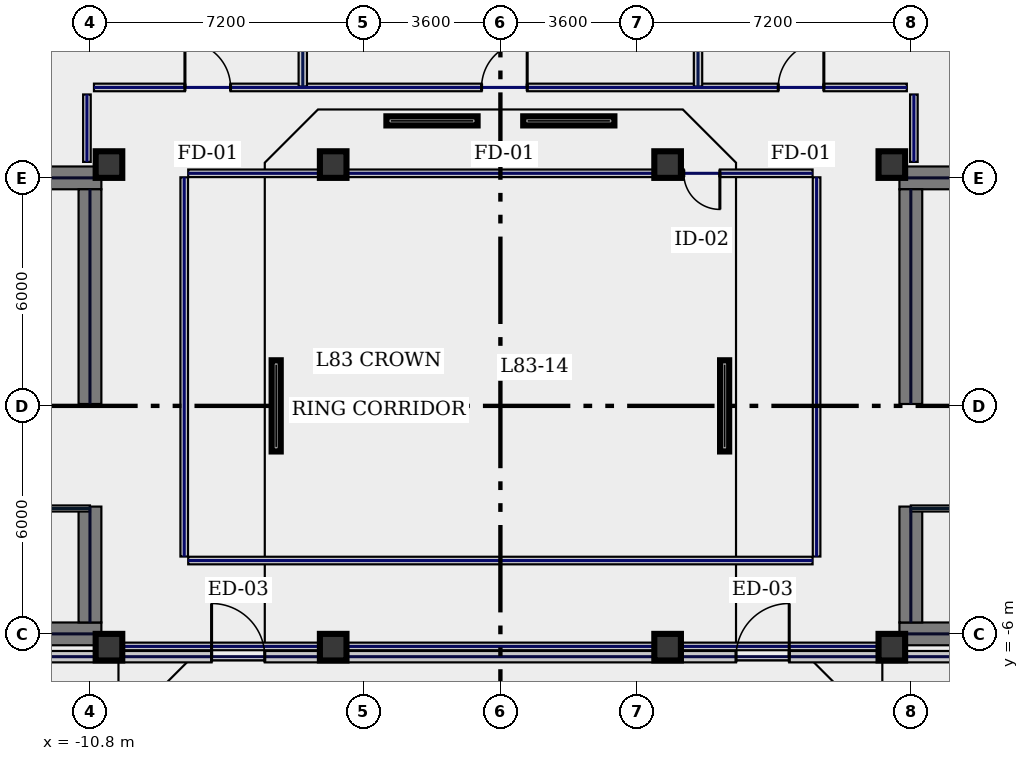
"""IFC4 building model, lengths in metres.
Left out: names, types, materials, properties, quantities, classifications, styles, units other than length and angle.
Written with IfcOpenShell. Run it as: python <this file> out.ifc"""

import sys

from ifc_helpers import new_model, si_unit, direction, frame, frame_2d, origin, origin_2d, place, context, subcontext, project, spatial, rectangle, hollow_rectangle, extrude, element, fill, save


model = new_model("IFC4")
c1 = context("Model", 3, precision=1e-05, world=origin(), true_north=direction((0.0, 1.0)))
c2 = subcontext(c1, "Body", "Model", "MODEL_VIEW")
j1 = project(units=[si_unit("LENGTHUNIT", "METRE"), si_unit("PLANEANGLEUNIT", "RADIAN")], contexts=[c1])
p1 = place(None, origin())
s1 = spatial("IfcSite", under=j1, at=p1, CompositionType="ELEMENT")
p2 = place(p1, origin())
s2 = spatial("IfcBuilding", under=s1, at=p2, CompositionType="ELEMENT")
p3 = place(p2, frame((0.0, 0.0, 357.0)))
s3 = spatial("IfcBuildingStorey", under=s2, at=p3, CompositionType="ELEMENT", Elevation=357.0)
for number, where, z_axis, x_axis in (
    (1, (-22.0, 6.0, 0.0), (0.0, 0.0, 1.0), (1.0, 0.0, 0.0)),
    (2, (-22.0, -6.0, 0.0), (0.0, 0.0, 1.0), (1.0, 0.0, 0.0)),
):
    element("IfcWall", number, at=place(p3, frame(where, z_axis=z_axis, x_axis=x_axis)), inside=s3, PredefinedType="SHEAR", context=c2, shape_type="SweptSolid", body=[
        extrude(rectangle(XDim=11.5, YDim=0.6, at=frame_2d((5.75, 0.0))), origin(), (0.0, 0.0, 1.0), 3.7),
    ])
p4 = place(p3, frame((-10.8, -5.7, 0.0), z_axis=(0.0, 0.0, 1.0), x_axis=(0.0, 1.0, 0.0)))
e3 = element("IfcWall", 3, at=p4, inside=s3, PredefinedType="SHEAR", context=c2, shape_type="SweptSolid", body=[
    extrude(rectangle(XDim=3.05, YDim=0.6, at=frame_2d((1.525, 0.0))), origin(), (0.0, 0.0, 1.0), 3.7),
])
p5 = place(p3, frame((-10.8, 0.05, 0.0), z_axis=(0.0, 0.0, 1.0), x_axis=(0.0, 1.0, 0.0)))
e4 = element("IfcWall", 4, at=p5, inside=s3, PredefinedType="SHEAR", context=c2, shape_type="SweptSolid", body=[
    extrude(rectangle(XDim=5.65, YDim=0.6, at=frame_2d((2.825, 0.0))), origin(), (0.0, 0.0, 1.0), 3.7),
])
for number, where, z_axis, x_axis in (
    (5, (10.5, 6.0, 0.0), (0.0, 0.0, 1.0), (1.0, 0.0, 0.0)),
    (6, (10.5, -6.0, 0.0), (0.0, 0.0, 1.0), (1.0, 0.0, 0.0)),
):
    element("IfcWall", number, at=place(p3, frame(where, z_axis=z_axis, x_axis=x_axis)), inside=s3, PredefinedType="SHEAR", context=c2, shape_type="SweptSolid", body=[
        extrude(rectangle(XDim=11.5, YDim=0.6, at=frame_2d((5.75, 0.0))), origin(), (0.0, 0.0, 1.0), 3.7),
    ])
p6 = place(p3, frame((10.8, -5.7, 0.0), z_axis=(0.0, 0.0, 1.0), x_axis=(0.0, 1.0, 0.0)))
e7 = element("IfcWall", 7, at=p6, inside=s3, PredefinedType="SHEAR", context=c2, shape_type="SweptSolid", body=[
    extrude(rectangle(XDim=3.05, YDim=0.6, at=frame_2d((1.525, 0.0))), origin(), (0.0, 0.0, 1.0), 3.7),
])
p7 = place(p3, frame((10.8, 0.05, 0.0), z_axis=(0.0, 0.0, 1.0), x_axis=(0.0, 1.0, 0.0)))
e8 = element("IfcWall", 8, at=p7, inside=s3, PredefinedType="SHEAR", context=c2, shape_type="SweptSolid", body=[
    extrude(rectangle(XDim=5.65, YDim=0.6, at=frame_2d((2.825, 0.0))), origin(), (0.0, 0.0, 1.0), 3.7),
])
for number, where, z_axis, x_axis in (
    (9, (-10.3, -6.35, 0.0), (0.0, 0.0, 1.0), (1.0, 0.0, 0.0)),
    (10, (-10.3, 6.35, 0.0), (0.0, 0.0, 1.0), (1.0, 0.0, 0.0)),
    (11, (10.3, -6.35, 0.0), (0.0, 0.0, 1.0), (1.0, 0.0, 0.0)),
    (12, (10.3, 6.35, 0.0), (0.0, 0.0, 1.0), (1.0, 0.0, 0.0)),
    (13, (-4.4, -6.35, 0.0), (0.0, 0.0, 1.0), (1.0, 0.0, 0.0)),
    (14, (4.4, -6.35, 0.0), (0.0, 0.0, 1.0), (1.0, 0.0, 0.0)),
    (15, (-4.4, 6.35, 0.0), (0.0, 0.0, 1.0), (1.0, 0.0, 0.0)),
    (16, (4.4, 6.35, 0.0), (0.0, 0.0, 1.0), (1.0, 0.0, 0.0)),
):
    element("IfcColumn", number, at=place(p3, frame(where, z_axis=z_axis, x_axis=x_axis)), inside=s3, PredefinedType="COLUMN", context=c2, shape_type="SweptSolid", body=[
        extrude(hollow_rectangle(XDim=0.7, YDim=0.7, WallThickness=0.032, at=origin_2d()), origin(), (0.0, 0.0, 1.0), 3.7),
    ])
p8 = place(p3, frame((-23.25, -6.6, 0.0), z_axis=(0.0, 0.0, 1.0), x_axis=(1.0, 0.0, 0.0)))
e17 = element("IfcWall", 17, at=p8, inside=s3, PredefinedType="STANDARD", context=c2, shape_type="SweptSolid", body=[
    extrude(rectangle(XDim=46.5, YDim=0.3, at=frame_2d((23.25, 0.0))), origin(), (0.0, 0.0, 1.0), 2.695),
])
p9 = place(p8, frame((15.65, 0.0, 0.32)))
e18 = element("IfcOpeningElement", 18, at=p9, cuts=e17, PredefinedType="OPENING", context=c2, shape_type="SweptSolid", body=[
    extrude(rectangle(XDim=1.4, YDim=2.2, at=frame_2d((0.7, 1.1))), frame((0.0, 0.16, 0.0), z_axis=(0.0, -1.0, 0.0), x_axis=(1.0, 0.0, 0.0)), (0.0, 0.0, 1.0), 0.32),
])
p10 = place(p8, frame((29.45, 0.0, 0.32)))
e19 = element("IfcOpeningElement", 19, at=p10, cuts=e17, PredefinedType="OPENING", context=c2, shape_type="SweptSolid", body=[
    extrude(rectangle(XDim=1.4, YDim=2.2, at=frame_2d((0.7, 1.1))), frame((0.0, 0.16, 0.0), z_axis=(0.0, -1.0, 0.0), x_axis=(1.0, 0.0, 0.0)), (0.0, 0.0, 1.0), 0.32),
])
for number, where, z_axis, x_axis in (
    (20, (-14.535, -2.7, 0.0), (0.0, 0.0, 1.0), (1.0, 0.0, 0.0)),
    (21, (10.8, -2.7, 0.0), (0.0, 0.0, 1.0), (1.0, 0.0, 0.0)),
):
    element("IfcWall", number, at=place(p3, frame(where, z_axis=z_axis, x_axis=x_axis)), inside=s3, PredefinedType="PARTITIONING", context=c2, shape_type="SweptSolid", body=[
        extrude(rectangle(XDim=3.735, YDim=0.16, at=frame_2d((1.867, 0.0))), origin(), (0.0, 0.0, 1.0), 3.7),
    ])
p11 = place(p3, frame((-10.88, 6.42, 0.0), z_axis=(0.0, 0.0, 1.0), x_axis=(0.0, 1.0, 0.0)))
e22 = element("IfcWall", 22, at=p11, inside=s3, PredefinedType="SOLIDWALL", context=c2, shape_type="SweptSolid", body=[
    extrude(rectangle(XDim=1.775, YDim=0.2, at=frame_2d((0.888, 0.0))), origin(), (0.0, 0.0, 1.0), 3.7),
])
p12 = place(p3, frame((-10.695, 8.38, 0.0), z_axis=(0.0, 0.0, 1.0), x_axis=(1.0, 0.0, 0.0)))
e23 = element("IfcWall", 23, at=p12, inside=s3, PredefinedType="SOLIDWALL", context=c2, shape_type="SweptSolid", body=[
    extrude(rectangle(XDim=21.39, YDim=0.2, at=frame_2d((10.695, 0.0))), origin(), (0.0, 0.0, 1.0), 3.7),
])
p13 = place(p12, frame((10.2, 0.0, 0.0)))
e24 = element("IfcOpeningElement", 24, at=p13, cuts=e23, PredefinedType="OPENING", context=c2, shape_type="SweptSolid", body=[
    extrude(rectangle(XDim=1.2, YDim=2.2, at=frame_2d((0.6, 1.1))), frame((0.0, 0.11, 0.0), z_axis=(0.0, -1.0, 0.0), x_axis=(1.0, 0.0, 0.0)), (0.0, 0.0, 1.0), 0.22),
])
p14 = place(p12, frame((2.394, 0.0, 0.0)))
e25 = element("IfcOpeningElement", 25, at=p14, cuts=e23, PredefinedType="OPENING", context=c2, shape_type="SweptSolid", body=[
    extrude(rectangle(XDim=1.2, YDim=2.2, at=frame_2d((0.6, 1.1))), frame((0.0, 0.11, 0.0), z_axis=(0.0, -1.0, 0.0), x_axis=(1.0, 0.0, 0.0)), (0.0, 0.0, 1.0), 0.22),
])
p15 = place(p12, frame((18.006, 0.0, 0.0)))
e26 = element("IfcOpeningElement", 26, at=p15, cuts=e23, PredefinedType="OPENING", context=c2, shape_type="SweptSolid", body=[
    extrude(rectangle(XDim=1.2, YDim=2.2, at=frame_2d((0.6, 1.1))), frame((0.0, 0.11, 0.0), z_axis=(0.0, -1.0, 0.0), x_axis=(1.0, 0.0, 0.0)), (0.0, 0.0, 1.0), 0.22),
])
p16 = place(p3, frame((10.88, 8.195, 0.0), z_axis=(0.0, 0.0, 1.0), x_axis=(0.0, -1.0, 0.0)))
e27 = element("IfcWall", 27, at=p16, inside=s3, PredefinedType="SOLIDWALL", context=c2, shape_type="SweptSolid", body=[
    extrude(rectangle(XDim=1.775, YDim=0.2, at=frame_2d((0.888, 0.0))), origin(), (0.0, 0.0, 1.0), 3.7),
])
p17 = place(p3, frame((10.38, -6.33, 0.0), z_axis=(0.0, 0.0, 1.0), x_axis=(-1.0, 0.0, 0.0)))
e28 = element("IfcWall", 28, at=p17, inside=s3, PredefinedType="SOLIDWALL", context=c2, shape_type="SweptSolid", body=[
    extrude(rectangle(XDim=20.76, YDim=0.2, at=frame_2d((10.38, 0.0))), origin(), (0.0, 0.0, 1.0), 2.695),
])
p18 = place(p3, frame((8.32, -3.965, 0.0), z_axis=(0.0, 0.0, 1.0), x_axis=(0.0, 1.0, 0.0)))
e29 = element("IfcWall", 29, at=p18, inside=s3, PredefinedType="SOLIDWALL", context=c2, shape_type="SweptSolid", body=[
    extrude(rectangle(XDim=9.98, YDim=0.2, at=frame_2d((4.99, 0.0))), origin(), (0.0, 0.0, 1.0), 3.7),
])
p19 = place(p3, frame((8.215, 6.12, 0.0), z_axis=(0.0, 0.0, 1.0), x_axis=(-1.0, 0.0, 0.0)))
e30 = element("IfcWall", 30, at=p19, inside=s3, PredefinedType="SOLIDWALL", context=c2, shape_type="SweptSolid", body=[
    extrude(rectangle(XDim=16.43, YDim=0.2, at=frame_2d((8.215, 0.0))), origin(), (0.0, 0.0, 1.0), 2.695),
])
p20 = place(p19, frame((2.44, 0.0, 0.0)))
e31 = element("IfcOpeningElement", 31, at=p20, cuts=e30, PredefinedType="OPENING", context=c2, shape_type="SweptSolid", body=[
    extrude(rectangle(XDim=0.95, YDim=2.2, at=frame_2d((0.475, 1.1))), frame((0.0, 0.11, 0.0), z_axis=(0.0, -1.0, 0.0), x_axis=(1.0, 0.0, 0.0)), (0.0, 0.0, 1.0), 0.22),
])
p21 = place(p3, frame((-8.32, 6.015, 0.0), z_axis=(0.0, 0.0, 1.0), x_axis=(0.0, -1.0, 0.0)))
e32 = element("IfcWall", 32, at=p21, inside=s3, PredefinedType="SOLIDWALL", context=c2, shape_type="SweptSolid", body=[
    extrude(rectangle(XDim=9.98, YDim=0.2, at=frame_2d((4.99, 0.0))), origin(), (0.0, 0.0, 1.0), 3.7),
])
p22 = place(p3, frame((-8.215, -4.07, 0.0), z_axis=(0.0, 0.0, 1.0), x_axis=(1.0, 0.0, 0.0)))
e33 = element("IfcWall", 33, at=p22, inside=s3, PredefinedType="SOLIDWALL", context=c2, shape_type="SweptSolid", body=[
    extrude(rectangle(XDim=16.43, YDim=0.2, at=frame_2d((8.215, 0.0))), origin(), (0.0, 0.0, 1.0), 3.7),
])
for number, where, z_axis, x_axis in (
    (34, (-5.2, 8.405, 0.0), (0.0, 0.0, 1.0), (0.0, 1.0, 0.0)),
    (35, (5.2, 8.405, 0.0), (0.0, 0.0, 1.0), (0.0, 1.0, 0.0)),
):
    element("IfcWall", number, at=place(p3, frame(where, z_axis=z_axis, x_axis=x_axis)), inside=s3, PredefinedType="SOLIDWALL", context=c2, shape_type="SweptSolid", body=[
        extrude(rectangle(XDim=8.245, YDim=0.22, at=frame_2d((4.123, 0.0))), origin(), (0.0, 0.0, 1.0), 3.7),
    ])
p23 = place(p9, origin())
e36 = element("IfcDoor", 36, at=p23, inside=s3, OperationType="SINGLE_SWING_LEFT", PredefinedType="DOOR", context=c2, shape_type="SweptSolid", body=[
    extrude(rectangle(XDim=1.4, YDim=2.2, at=frame_2d((0.7, 1.1))), frame((0.0, 0.025, 0.0), z_axis=(0.0, -1.0, 0.0), x_axis=(1.0, 0.0, 0.0)), (0.0, 0.0, 1.0), 0.05),
])
fill(e18, e36)
p24 = place(p10, origin())
e37 = element("IfcDoor", 37, at=p24, inside=s3, OperationType="SINGLE_SWING_RIGHT", PredefinedType="DOOR", context=c2, shape_type="SweptSolid", body=[
    extrude(rectangle(XDim=1.4, YDim=2.2, at=frame_2d((0.7, 1.1))), frame((0.0, 0.025, 0.0), z_axis=(0.0, -1.0, 0.0), x_axis=(1.0, 0.0, 0.0)), (0.0, 0.0, 1.0), 0.05),
])
fill(e19, e37)
p25 = place(p20, origin())
e38 = element("IfcDoor", 38, at=p25, inside=s3, OperationType="SINGLE_SWING_LEFT", PredefinedType="DOOR", context=c2, shape_type="SweptSolid", body=[
    extrude(rectangle(XDim=0.95, YDim=2.2, at=frame_2d((0.475, 1.1))), frame((0.0, 0.025, 0.0), z_axis=(0.0, -1.0, 0.0), x_axis=(1.0, 0.0, 0.0)), (0.0, 0.0, 1.0), 0.05),
])
fill(e31, e38)
p26 = place(p13, origin())
e39 = element("IfcDoor", 39, at=p26, inside=s3, OperationType="SINGLE_SWING_RIGHT", PredefinedType="DOOR", context=c2, shape_type="SweptSolid", body=[
    extrude(rectangle(XDim=1.2, YDim=2.2, at=frame_2d((0.6, 1.1))), frame((0.0, 0.025, 0.0), z_axis=(0.0, -1.0, 0.0), x_axis=(1.0, 0.0, 0.0)), (0.0, 0.0, 1.0), 0.05),
])
fill(e24, e39)
p27 = place(p14, origin())
e40 = element("IfcDoor", 40, at=p27, inside=s3, OperationType="SINGLE_SWING_LEFT", PredefinedType="DOOR", context=c2, shape_type="SweptSolid", body=[
    extrude(rectangle(XDim=1.2, YDim=2.2, at=frame_2d((0.6, 1.1))), frame((0.0, 0.025, 0.0), z_axis=(0.0, -1.0, 0.0), x_axis=(1.0, 0.0, 0.0)), (0.0, 0.0, 1.0), 0.05),
])
fill(e25, e40)
p28 = place(p15, origin())
e41 = element("IfcDoor", 41, at=p28, inside=s3, OperationType="SINGLE_SWING_RIGHT", PredefinedType="DOOR", context=c2, shape_type="SweptSolid", body=[
    extrude(rectangle(XDim=1.2, YDim=2.2, at=frame_2d((0.6, 1.1))), frame((0.0, 0.025, 0.0), z_axis=(0.0, -1.0, 0.0), x_axis=(1.0, 0.0, 0.0)), (0.0, 0.0, 1.0), 0.05),
])
fill(e26, e41)
save(model, sys.argv[1])
